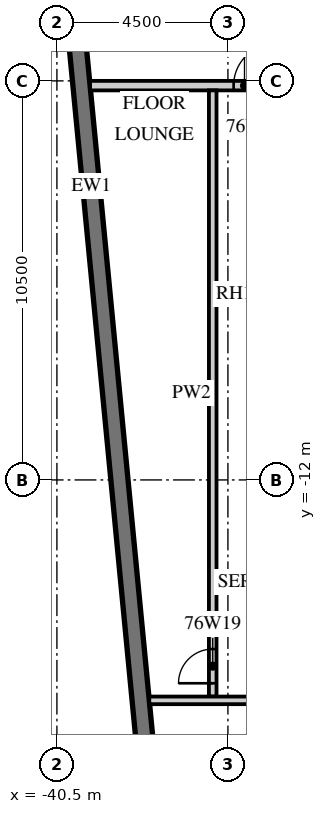
"""IFC4 building model, lengths in metres.
Left out: names, types, materials, properties, quantities, classifications, styles, units other than length and angle.
Written with IfcOpenShell. Run it as: python <this file> out.ifc"""

import sys

from ifc_helpers import new_model, si_unit, direction, frame, frame_2d, origin, place, context, subcontext, project, spatial, rectangle, extrude, element, fill, save


model = new_model("IFC4")
c1 = context("Model", 3, precision=1e-05, world=origin(), true_north=direction((0.0, 1.0)))
c2 = subcontext(c1, "Body", "Model", "MODEL_VIEW")
j1 = project(units=[si_unit("LENGTHUNIT", "METRE"), si_unit("PLANEANGLEUNIT", "RADIAN")], contexts=[c1])
p1 = place(None, origin())
s1 = spatial("IfcSite", under=j1, at=p1, CompositionType="ELEMENT")
p2 = place(p1, origin())
s2 = spatial("IfcBuilding", under=s1, at=p2, CompositionType="ELEMENT")
p3 = place(p2, frame((0.0, 0.0, 301.5)))
s3 = spatial("IfcBuildingStorey", under=s2, at=p3, CompositionType="ELEMENT", Elevation=301.5)
p4 = place(p3, frame((-41.132, 11.658, 0.0), z_axis=(0.0, 0.0, 1.0), x_axis=(0.095847749461, -0.995396006082, 0.0)))
e1 = element("IfcWall", 1, at=p4, inside=s3, PredefinedType="SOLIDWALL", context=c2, shape_type="SweptSolid", body=[
    extrude(rectangle(XDim=32.0, YDim=0.45, at=frame_2d((16.0, 0.0))), origin(), (0.0, 0.0, 1.0), 3.02),
])
p5 = place(p4, frame((2.053, 0.0, 0.45)))
e2 = element("IfcOpeningElement", 2, at=p5, cuts=e1, PredefinedType="OPENING", context=c2, shape_type="SweptSolid", body=[
    extrude(rectangle(XDim=3.3, YDim=2.25, at=frame_2d((1.65, 1.125))), frame((0.0, 0.235, 0.0), z_axis=(0.0, -1.0, 0.0), x_axis=(1.0, 0.0, 0.0)), (0.0, 0.0, 1.0), 0.47),
])
p6 = place(p4, frame((6.574, 0.0, 0.45)))
e3 = element("IfcOpeningElement", 3, at=p6, cuts=e1, PredefinedType="OPENING", context=c2, shape_type="SweptSolid", body=[
    extrude(rectangle(XDim=3.3, YDim=2.25, at=frame_2d((1.65, 1.125))), frame((0.0, 0.235, 0.0), z_axis=(0.0, -1.0, 0.0), x_axis=(1.0, 0.0, 0.0)), (0.0, 0.0, 1.0), 0.47),
])
p7 = place(p3, frame((-39.627, -1.625, 0.0), z_axis=(0.0, 0.0, 1.0), x_axis=(1.0, 0.0, 0.0)))
e4 = element("IfcWall", 4, at=p7, inside=s3, PredefinedType="PARTITIONING", context=c2, shape_type="SweptSolid", body=[
    extrude(rectangle(XDim=8.127, YDim=0.25, at=frame_2d((4.063, 0.0))), origin(), (0.0, 0.0, 1.0), 3.02),
])
p8 = place(p7, frame((6.202, 0.0, 0.0)))
e5 = element("IfcOpeningElement", 5, at=p8, cuts=e4, PredefinedType="OPENING", context=c2, shape_type="SweptSolid", body=[
    extrude(rectangle(XDim=1.3, YDim=2.1, at=frame_2d((0.65, 1.05))), frame((0.0, 0.135, 0.0), z_axis=(0.0, -1.0, 0.0), x_axis=(1.0, 0.0, 0.0)), (0.0, 0.0, 1.0), 0.27),
])
p9 = place(p7, frame((3.777, 0.0, 0.0)))
e6 = element("IfcOpeningElement", 6, at=p9, cuts=e4, PredefinedType="OPENING", context=c2, shape_type="SweptSolid", body=[
    extrude(rectangle(XDim=1.1, YDim=2.1, at=frame_2d((0.55, 1.05))), frame((0.0, 0.135, 0.0), z_axis=(0.0, -1.0, 0.0), x_axis=(1.0, 0.0, 0.0)), (0.0, 0.0, 1.0), 0.27),
])
p10 = place(p3, frame((-36.4, -17.7, 0.0), z_axis=(0.0, 0.0, 1.0), x_axis=(0.0, 1.0, 0.0)))
e7 = element("IfcWall", 7, at=p10, inside=s3, PredefinedType="PARTITIONING", context=c2, shape_type="SweptSolid", body=[
    extrude(rectangle(XDim=15.95, YDim=0.2, at=frame_2d((7.975, 0.0))), origin(), (0.0, 0.0, 1.0), 3.02),
])
p11 = place(p10, frame((0.35, 0.0, 0.0)))
e8 = element("IfcOpeningElement", 8, at=p11, cuts=e7, PredefinedType="OPENING", context=c2, shape_type="SweptSolid", body=[
    extrude(rectangle(XDim=0.9, YDim=2.1, at=frame_2d((0.45, 1.05))), frame((0.0, 0.11, 0.0), z_axis=(0.0, -1.0, 0.0), x_axis=(1.0, 0.0, 0.0)), (0.0, 0.0, 1.0), 0.22),
])
p12 = place(p3, frame((-38.07, -17.8, 0.0), z_axis=(0.0, 0.0, 1.0), x_axis=(1.0, 0.0, 0.0)))
e9 = element("IfcWall", 9, at=p12, inside=s3, PredefinedType="PARTITIONING", context=c2, shape_type="SweptSolid", body=[
    extrude(rectangle(XDim=24.47, YDim=0.2, at=frame_2d((12.235, 0.0))), origin(), (0.0, 0.0, 1.0), 3.02),
])
p13 = place(p12, frame((8.557, 0.0, 0.0)))
e10 = element("IfcOpeningElement", 10, at=p13, cuts=e9, PredefinedType="OPENING", context=c2, shape_type="SweptSolid", body=[
    extrude(rectangle(XDim=0.9, YDim=2.1, at=frame_2d((0.45, 1.05))), frame((0.0, 0.11, 0.0), z_axis=(0.0, -1.0, 0.0), x_axis=(1.0, 0.0, 0.0)), (0.0, 0.0, 1.0), 0.22),
])
p14 = place(p12, frame((16.857, 0.0, 0.0)))
e11 = element("IfcOpeningElement", 11, at=p14, cuts=e9, PredefinedType="OPENING", context=c2, shape_type="SweptSolid", body=[
    extrude(rectangle(XDim=0.9, YDim=2.1, at=frame_2d((0.45, 1.05))), frame((0.0, 0.11, 0.0), z_axis=(0.0, -1.0, 0.0), x_axis=(1.0, 0.0, 0.0)), (0.0, 0.0, 1.0), 0.22),
])
p15 = place(p9, origin())
e12 = element("IfcDoor", 12, at=p15, inside=s3, OperationType="SINGLE_SWING_RIGHT", PredefinedType="DOOR", context=c2, shape_type="SweptSolid", body=[
    extrude(rectangle(XDim=1.1, YDim=2.1, at=frame_2d((0.55, 1.05))), frame((0.0, 0.025, 0.0), z_axis=(0.0, -1.0, 0.0), x_axis=(1.0, 0.0, 0.0)), (0.0, 0.0, 1.0), 0.05),
])
fill(e6, e12)
p16 = place(p11, origin())
e13 = element("IfcDoor", 13, at=p16, inside=s3, OperationType="SINGLE_SWING_LEFT", PredefinedType="DOOR", context=c2, shape_type="SweptSolid", body=[
    extrude(rectangle(XDim=0.9, YDim=2.1, at=frame_2d((0.45, 1.05))), frame((0.0, 0.025, 0.0), z_axis=(0.0, -1.0, 0.0), x_axis=(1.0, 0.0, 0.0)), (0.0, 0.0, 1.0), 0.05),
])
fill(e8, e13)
save(model, sys.argv[1])
